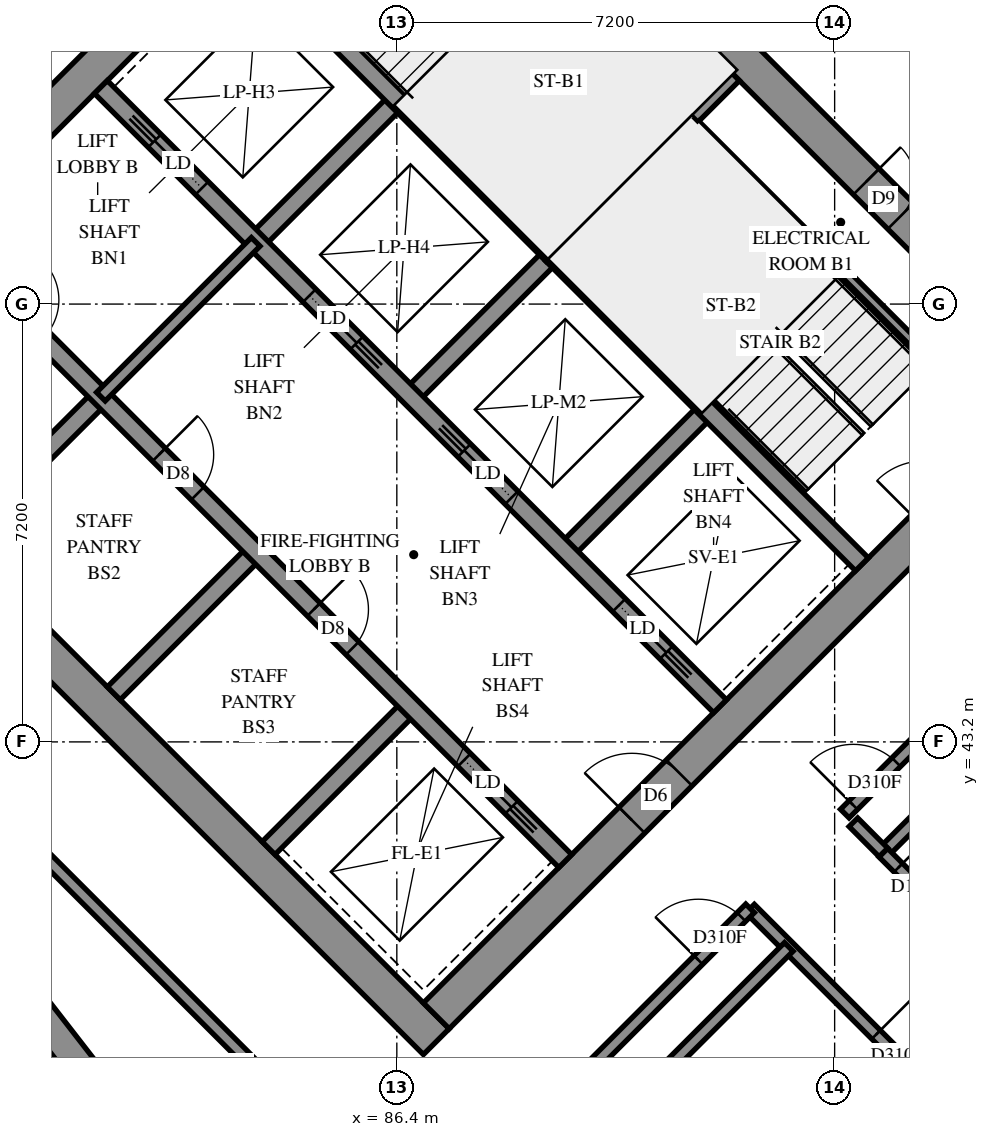
"""IFC4 building model, lengths in metres.
Left out: names, types, materials, properties, quantities, classifications, styles, units other than length and angle.
Written with IfcOpenShell. Run it as: python <this file> out.ifc"""

import sys

from ifc_helpers import new_model, si_unit, direction, frame, frame_2d, origin, place, context, subcontext, project, spatial, polyline, rectangle, outline, extrude, element, fill, save


model = new_model("IFC4")
c1 = context("Model", 3, precision=1e-05, world=origin(), true_north=direction((0.0, 1.0)))
c2 = subcontext(c1, "Body", "Model", "MODEL_VIEW")
j1 = project(units=[si_unit("LENGTHUNIT", "METRE"), si_unit("PLANEANGLEUNIT", "RADIAN")], contexts=[c1])
p1 = place(None, origin())
s1 = spatial("IfcSite", under=j1, at=p1, CompositionType="ELEMENT")
p2 = place(p1, origin())
s2 = spatial("IfcBuilding", under=s1, at=p2, CompositionType="ELEMENT")
p3 = place(p2, frame((0.0, 0.0, 159.2)))
s3 = spatial("IfcBuildingStorey", under=s2, at=p3, CompositionType="ELEMENT", Elevation=159.2)
p4 = place(p3, frame((76.018, 49.302, -0.3), z_axis=(0.0, 0.0, 1.0), x_axis=(0.7071067812, -0.7071067812, 0.0)))
e1 = element("IfcWall", 1, at=p4, inside=s3, PredefinedType="SHEAR", context=c2, shape_type="SweptSolid", body=[
    extrude(rectangle(XDim=15.6, YDim=0.6, at=frame_2d((7.8, 0.0))), origin(), (0.0, 0.0, 1.0), 2.7),
])
p5 = place(p3, frame((86.625, 59.908, -0.3), z_axis=(0.0, 0.0, 1.0), x_axis=(0.7071067812, -0.7071067812, 0.0)))
e2 = element("IfcWall", 2, at=p5, inside=s3, PredefinedType="SHEAR", context=c2, shape_type="SweptSolid", body=[
    extrude(rectangle(XDim=15.6, YDim=0.6, at=frame_2d((7.8, 0.0))), origin(), (0.0, 0.0, 1.0), 2.7),
])
p6 = place(p5, frame((10.6, 0.0, 0.3)))
e3 = element("IfcOpeningElement", 3, at=p6, cuts=e2, PredefinedType="OPENING", context=c2, shape_type="SweptSolid", body=[
    extrude(rectangle(XDim=0.8, YDim=2.1, at=frame_2d((0.4, 1.05))), frame((0.0, 0.31, 0.0), z_axis=(0.0, -1.0, 0.0), x_axis=(1.0, 0.0, 0.0)), (0.0, 0.0, 1.0), 0.62),
])
p7 = place(p3, frame((76.442, 49.302, -0.3), z_axis=(0.0, 0.0, 1.0), x_axis=(0.7071067812, 0.7071067812, 0.0)))
e4 = element("IfcWall", 4, at=p7, inside=s3, PredefinedType="SHEAR", context=c2, shape_type="SweptSolid", body=[
    extrude(rectangle(XDim=14.4, YDim=0.6, at=frame_2d((7.2, 0.0))), origin(), (0.0, 0.0, 1.0), 2.7),
])
p8 = place(p7, frame((4.55, 0.0, 0.3)))
e5 = element("IfcOpeningElement", 5, at=p8, cuts=e4, PredefinedType="OPENING", context=c2, shape_type="SweptSolid", body=[
    extrude(rectangle(XDim=1.1, YDim=2.1, at=frame_2d((0.55, 1.05))), frame((0.0, 0.31, 0.0), z_axis=(0.0, -1.0, 0.0), x_axis=(1.0, 0.0, 0.0)), (0.0, 0.0, 1.0), 0.62),
])
p9 = place(p7, frame((11.35, 0.0, 0.3)))
e6 = element("IfcOpeningElement", 6, at=p9, cuts=e4, PredefinedType="OPENING", context=c2, shape_type="SweptSolid", body=[
    extrude(rectangle(XDim=1.1, YDim=2.1, at=frame_2d((0.55, 1.05))), frame((0.0, 0.31, 0.0), z_axis=(0.0, -1.0, 0.0), x_axis=(1.0, 0.0, 0.0)), (0.0, 0.0, 1.0), 0.62),
])
p10 = place(p3, frame((87.049, 38.695, -0.3), z_axis=(0.0, 0.0, 1.0), x_axis=(0.7071067812, 0.7071067812, 0.0)))
e7 = element("IfcWall", 7, at=p10, inside=s3, PredefinedType="SHEAR", context=c2, shape_type="SweptSolid", body=[
    extrude(rectangle(XDim=14.4, YDim=0.6, at=frame_2d((7.2, 0.0))), origin(), (0.0, 0.0, 1.0), 2.7),
])
p11 = place(p10, frame((4.55, 0.0, 0.3)))
e8 = element("IfcOpeningElement", 8, at=p11, cuts=e7, PredefinedType="OPENING", context=c2, shape_type="SweptSolid", body=[
    extrude(rectangle(XDim=1.1, YDim=2.1, at=frame_2d((0.55, 1.05))), frame((0.0, 0.31, 0.0), z_axis=(0.0, -1.0, 0.0), x_axis=(1.0, 0.0, 0.0)), (0.0, 0.0, 1.0), 0.62),
])
p12 = place(p10, frame((11.35, 0.0, 0.3)))
e9 = element("IfcOpeningElement", 9, at=p12, cuts=e7, PredefinedType="OPENING", context=c2, shape_type="SweptSolid", body=[
    extrude(rectangle(XDim=1.1, YDim=2.1, at=frame_2d((0.55, 1.05))), frame((0.0, 0.31, 0.0), z_axis=(0.0, -1.0, 0.0), x_axis=(1.0, 0.0, 0.0)), (0.0, 0.0, 1.0), 0.62),
])
for number, where, z_axis, x_axis in (
    (10, (79.2, 46.544, 0.0), (0.0, 0.0, 1.0), (0.707, 0.707, 0.0)),
    (11, (84.079, 51.423, 0.0), (0.0, 0.0, 1.0), (0.707, 0.707, 0.0)),
):
    element("IfcWall", number, at=place(p3, frame(where, z_axis=z_axis, x_axis=x_axis)), inside=s3, PredefinedType="SOLIDWALL", context=c2, shape_type="SweptSolid", body=[
        extrude(rectangle(XDim=3.3, YDim=0.3, at=frame_2d((1.65, 0.0))), origin(), (0.0, 0.0, 1.0), 3.1),
    ])
p13 = place(p3, frame((81.746, 43.999, 0.0), z_axis=(0.0, 0.0, 1.0), x_axis=(0.7071067812, 0.7071067812, 0.0)))
e12 = element("IfcWall", 12, at=p13, inside=s3, PredefinedType="SOLIDWALL", context=c2, shape_type="SweptSolid", body=[
    extrude(rectangle(XDim=3.3, YDim=0.3, at=frame_2d((1.65, 0.0))), origin(), (0.0, 0.0, 1.0), 3.1),
])
p14 = place(p3, frame((86.625, 48.878, 0.0), z_axis=(0.0, 0.0, 1.0), x_axis=(0.7071067812, 0.7071067812, 0.0)))
e13 = element("IfcWall", 13, at=p14, inside=s3, PredefinedType="SOLIDWALL", context=c2, shape_type="SweptSolid", body=[
    extrude(rectangle(XDim=3.3, YDim=0.3, at=frame_2d((1.65, 0.0))), origin(), (0.0, 0.0, 1.0), 3.1),
])
p15 = place(p3, frame((84.291, 41.453, 0.0), z_axis=(0.0, 0.0, 1.0), x_axis=(0.7071067812, 0.7071067812, 0.0)))
e14 = element("IfcWall", 14, at=p15, inside=s3, PredefinedType="SOLIDWALL", context=c2, shape_type="SweptSolid", body=[
    extrude(rectangle(XDim=3.3, YDim=0.3, at=frame_2d((1.65, 0.0))), origin(), (0.0, 0.0, 1.0), 3.1),
])
p16 = place(p3, frame((89.17, 46.332, 0.0), z_axis=(0.0, 0.0, 1.0), x_axis=(0.7071067812, 0.7071067812, 0.0)))
e15 = element("IfcWall", 15, at=p16, inside=s3, PredefinedType="SOLIDWALL", context=c2, shape_type="SweptSolid", body=[
    extrude(rectangle(XDim=3.3, YDim=0.3, at=frame_2d((1.65, 0.0))), origin(), (0.0, 0.0, 1.0), 3.1),
])
p17 = place(p3, frame((78.988, 51.423, 0.0), z_axis=(0.0, 0.0, 1.0), x_axis=(0.7071067812, -0.7071067812, 0.0)))
e16 = element("IfcWall", 16, at=p17, inside=s3, PredefinedType="SOLIDWALL", context=c2, shape_type="SweptSolid", body=[
    extrude(rectangle(XDim=14.4, YDim=0.3, at=frame_2d((7.2, 0.0))), origin(), (0.0, 0.0, 1.0), 3.1),
])
p18 = place(p17, frame((1.35, 0.0, 0.0)))
e17 = element("IfcOpeningElement", 17, at=p18, cuts=e16, PredefinedType="OPENING", context=c2, shape_type="SweptSolid", body=[
    extrude(rectangle(XDim=0.9, YDim=2.1, at=frame_2d((0.45, 1.05))), frame((0.0, 0.16, 0.0), z_axis=(0.0, -1.0, 0.0), x_axis=(1.0, 0.0, 0.0)), (0.0, 0.0, 1.0), 0.32),
])
p19 = place(p17, frame((4.95, 0.0, 0.0)))
e18 = element("IfcOpeningElement", 18, at=p19, cuts=e16, PredefinedType="OPENING", context=c2, shape_type="SweptSolid", body=[
    extrude(rectangle(XDim=0.9, YDim=2.1, at=frame_2d((0.45, 1.05))), frame((0.0, 0.16, 0.0), z_axis=(0.0, -1.0, 0.0), x_axis=(1.0, 0.0, 0.0)), (0.0, 0.0, 1.0), 0.32),
])
p20 = place(p17, frame((8.55, 0.0, 0.0)))
e19 = element("IfcOpeningElement", 19, at=p20, cuts=e16, PredefinedType="OPENING", context=c2, shape_type="SweptSolid", body=[
    extrude(rectangle(XDim=0.9, YDim=2.1, at=frame_2d((0.45, 1.05))), frame((0.0, 0.16, 0.0), z_axis=(0.0, -1.0, 0.0), x_axis=(1.0, 0.0, 0.0)), (0.0, 0.0, 1.0), 0.32),
])
p21 = place(p17, frame((12.05, 0.0, 0.0)))
e20 = element("IfcOpeningElement", 20, at=p21, cuts=e16, PredefinedType="OPENING", context=c2, shape_type="SweptSolid", body=[
    extrude(rectangle(XDim=1.1, YDim=2.1, at=frame_2d((0.55, 1.05))), frame((0.0, 0.16, 0.0), z_axis=(0.0, -1.0, 0.0), x_axis=(1.0, 0.0, 0.0)), (0.0, 0.0, 1.0), 0.32),
])
p22 = place(p3, frame((81.534, 53.969, 0.0), z_axis=(0.0, 0.0, 1.0), x_axis=(0.707103309, -0.7071102534, 0.0)))
e21 = element("IfcWall", 21, at=p22, inside=s3, PredefinedType="SOLIDWALL", context=c2, shape_type="SweptSolid", body=[
    extrude(rectangle(XDim=14.4, YDim=0.3, at=frame_2d((7.2, 0.0))), origin(), (0.0, 0.0, 1.0), 3.1),
])
p23 = place(p22, frame((1.25, 0.0, 0.0)))
e22 = element("IfcOpeningElement", 22, at=p23, cuts=e21, PredefinedType="OPENING", context=c2, shape_type="SweptSolid", body=[
    extrude(rectangle(XDim=1.1, YDim=2.1, at=frame_2d((0.55, 1.05))), frame((0.0, 0.16, 0.0), z_axis=(0.0, -1.0, 0.0), x_axis=(1.0, 0.0, 0.0)), (0.0, 0.0, 1.0), 0.32),
])
p24 = place(p22, frame((4.85, 0.0, 0.0)))
e23 = element("IfcOpeningElement", 23, at=p24, cuts=e21, PredefinedType="OPENING", context=c2, shape_type="SweptSolid", body=[
    extrude(rectangle(XDim=1.1, YDim=2.1, at=frame_2d((0.55, 1.05))), frame((0.0, 0.16, 0.0), z_axis=(0.0, -1.0, 0.0), x_axis=(1.0, 0.0, 0.0)), (0.0, 0.0, 1.0), 0.32),
])
p25 = place(p22, frame((8.45, 0.0, 0.0)))
e24 = element("IfcOpeningElement", 24, at=p25, cuts=e21, PredefinedType="OPENING", context=c2, shape_type="SweptSolid", body=[
    extrude(rectangle(XDim=1.1, YDim=2.1, at=frame_2d((0.55, 1.05))), frame((0.0, 0.16, 0.0), z_axis=(0.0, -1.0, 0.0), x_axis=(1.0, 0.0, 0.0)), (0.0, 0.0, 1.0), 0.32),
])
p26 = place(p22, frame((12.05, 0.0, 0.0)))
e25 = element("IfcOpeningElement", 25, at=p26, cuts=e21, PredefinedType="OPENING", context=c2, shape_type="SweptSolid", body=[
    extrude(rectangle(XDim=1.1, YDim=2.1, at=frame_2d((0.55, 1.05))), frame((0.0, 0.16, 0.0), z_axis=(0.0, -1.0, 0.0), x_axis=(1.0, 0.0, 0.0)), (0.0, 0.0, 1.0), 0.32),
])
for number, where, z_axis, x_axis in (
    (26, (83.867, 56.302, 0.0), (0.0, 0.0, 1.0), (0.707, -0.707, 0.0)),
    (27, (88.958, 51.211, 0.0), (0.0, 0.0, 1.0), (0.707, -0.707, 0.0)),
):
    element("IfcWall", number, at=place(p3, frame(where, z_axis=z_axis, x_axis=x_axis)), inside=s3, PredefinedType="SOLIDWALL", context=c2, shape_type="SweptSolid", body=[
        extrude(rectangle(XDim=7.2, YDim=0.3, at=frame_2d((3.6, 0.0))), origin(), (0.0, 0.0, 1.0), 3.1),
    ])
p27 = place(p3, frame((88.958, 51.211, 0.0), z_axis=(0.0, 0.0, 1.0), x_axis=(0.7071067812, 0.7071067812, 0.0)))
e28 = element("IfcWall", 28, at=p27, inside=s3, PredefinedType="SOLIDWALL", context=c2, shape_type="SweptSolid", body=[
    extrude(rectangle(XDim=4.2, YDim=0.3, at=frame_2d((2.1, 0.0))), origin(), (0.0, 0.0, 1.0), 3.1),
])
p28 = place(p3, frame((80.314, 39.002, 0.0), z_axis=(0.0, 0.0, 1.0), x_axis=(0.6128921644, -0.7901665614, 0.0)))
e29 = element("IfcWall", 29, at=p28, inside=s3, PredefinedType="SOLIDWALL", context=c2, shape_type="SweptSolid", body=[
    extrude(outline(polyline([(0.05, -0.25), (4.134, -0.25), (4.071, 0.25), (-0.05, 0.25), (0.05, -0.25)])), origin(), (0.0, 0.0, 1.0), 3.1),
])
p29 = place(p28, frame((1.879, 0.0, 0.45)))
e30 = element("IfcOpeningElement", 30, at=p29, cuts=e29, PredefinedType="OPENING", context=c2, shape_type="SweptSolid", body=[
    extrude(rectangle(XDim=1.2, YDim=2.5, at=frame_2d((0.6, 1.25))), frame((0.0, 0.26, 0.0), z_axis=(0.0, -1.0, 0.0), x_axis=(1.0, 0.0, 0.0)), (0.0, 0.0, 1.0), 0.52),
])
p30 = place(p3, frame((91.313, 53.354, 0.0), z_axis=(0.0, 0.0, 1.0), x_axis=(0.7071067812, -0.7071067812, 0.0)))
e31 = element("IfcWall", 31, at=p30, inside=s3, PredefinedType="PARTITIONING", context=c2, shape_type="SweptSolid", body=[
    extrude(rectangle(XDim=5.65, YDim=0.15, at=frame_2d((2.825, 0.0))), origin(), (0.0, 0.0, 1.0), 3.1),
])
p31 = place(p3, frame((81.534, 48.878, 0.0), z_axis=(0.0, 0.0, 1.0), x_axis=(0.707092892, 0.7071206701, 0.0)))
e32 = element("IfcWall", 32, at=p31, inside=s3, PredefinedType="PARTITIONING", context=c2, shape_type="SweptSolid", body=[
    extrude(rectangle(XDim=3.6, YDim=0.2, at=frame_2d((1.8, 0.0))), origin(), (0.0, 0.0, 1.0), 3.1),
])
p32 = place(p3, frame((86.841, 63.093, 0.0), z_axis=(0.0, 0.0, 1.0), x_axis=(0.7071067812, -0.7071067812, 0.0)))
e33 = element("IfcWall", 33, at=p32, inside=s3, PredefinedType="PARTITIONING", context=c2, shape_type="SweptSolid", body=[
    extrude(rectangle(XDim=12.239, YDim=0.2, at=frame_2d((6.119, 0.0))), origin(), (0.0, 0.0, 1.0), 3.1),
])
p33 = place(p32, frame((10.634, 0.0, 0.0)))
e34 = element("IfcOpeningElement", 34, at=p33, cuts=e33, PredefinedType="OPENING", context=c2, shape_type="SweptSolid", body=[
    extrude(rectangle(XDim=0.9, YDim=2.1, at=frame_2d((0.45, 1.05))), frame((0.0, 0.11, 0.0), z_axis=(0.0, -1.0, 0.0), x_axis=(1.0, 0.0, 0.0)), (0.0, 0.0, 1.0), 0.22),
])
p34 = place(p3, frame((94.401, 41.383, 0.0), z_axis=(0.0, 0.0, 1.0), x_axis=(0.7071067812, 0.7071067812, 0.0)))
e35 = element("IfcWall", 35, at=p34, inside=s3, PredefinedType="PARTITIONING", context=c2, shape_type="SweptSolid", body=[
    extrude(rectangle(XDim=12.04, YDim=0.2, at=frame_2d((6.02, 0.0))), origin(), (0.0, 0.0, 1.0), 3.1),
])
p35 = place(p3, frame((92.209, 40.459, 0.0), z_axis=(0.0, 0.0, 1.0), x_axis=(0.7071067812, -0.7071067812, 0.0)))
e36 = element("IfcWall", 36, at=p35, inside=s3, PredefinedType="PARTITIONING", context=c2, shape_type="SweptSolid", body=[
    extrude(rectangle(XDim=11.698, YDim=0.2, at=frame_2d((5.849, 0.0))), origin(), (0.0, 0.0, 1.0), 3.1),
])
p36 = place(p35, frame((2.931, 0.0, 0.0)))
e37 = element("IfcOpeningElement", 37, at=p36, cuts=e36, PredefinedType="OPENING", context=c2, shape_type="SweptSolid", body=[
    extrude(rectangle(XDim=1.0, YDim=2.1, at=frame_2d((0.5, 1.05))), frame((0.0, 0.11, 0.0), z_axis=(0.0, -1.0, 0.0), x_axis=(1.0, 0.0, 0.0)), (0.0, 0.0, 1.0), 0.22),
])
p37 = place(p35, frame((10.223, 0.0, 0.0)))
e38 = element("IfcOpeningElement", 38, at=p37, cuts=e36, PredefinedType="OPENING", context=c2, shape_type="SweptSolid", body=[
    extrude(rectangle(XDim=0.9, YDim=2.1, at=frame_2d((0.45, 1.05))), frame((0.0, 0.11, 0.0), z_axis=(0.0, -1.0, 0.0), x_axis=(1.0, 0.0, 0.0)), (0.0, 0.0, 1.0), 0.22),
])
p38 = place(p3, frame((93.767, 42.021, 0.0), z_axis=(0.0, 0.0, 1.0), x_axis=(0.7071067812, 0.7071067812, 0.0)))
e39 = element("IfcWall", 39, at=p38, inside=s3, PredefinedType="PARTITIONING", context=c2, shape_type="SweptSolid", body=[
    extrude(rectangle(XDim=9.998, YDim=0.2, at=frame_2d((4.999, 0.0))), origin(), (0.0, 0.0, 1.0), 3.1),
])
p39 = place(p38, frame((0.196, 0.0, 0.0)))
e40 = element("IfcOpeningElement", 40, at=p39, cuts=e39, PredefinedType="OPENING", context=c2, shape_type="SweptSolid", body=[
    extrude(rectangle(XDim=1.0, YDim=2.1, at=frame_2d((0.5, 1.05))), frame((0.0, 0.11, 0.0), z_axis=(0.0, -1.0, 0.0), x_axis=(1.0, 0.0, 0.0)), (0.0, 0.0, 1.0), 0.22),
])
p40 = place(p3, frame((80.423, 41.497, 0.0), z_axis=(0.0, 0.0, 1.0), x_axis=(0.7071067812, -0.7071067812, 0.0)))
e41 = element("IfcWall", 41, at=p40, inside=s3, PredefinedType="PARTITIONING", context=c2, shape_type="SweptSolid", body=[
    extrude(rectangle(XDim=9.065, YDim=0.2, at=frame_2d((4.532, 0.0))), origin(), (0.0, 0.0, 1.0), 3.1),
])
p41 = place(p3, frame((86.837, 35.091, 0.0), z_axis=(0.0, 0.0, 1.0), x_axis=(0.7071067812, 0.7071067812, 0.0)))
e42 = element("IfcWall", 42, at=p41, inside=s3, PredefinedType="PARTITIONING", context=c2, shape_type="SweptSolid", body=[
    extrude(rectangle(XDim=7.597, YDim=0.2, at=frame_2d((3.799, 0.0))), origin(), (0.0, 0.0, 1.0), 3.1),
])
p42 = place(p41, frame((6.395, 0.0, 0.0)))
e43 = element("IfcOpeningElement", 43, at=p42, cuts=e42, PredefinedType="OPENING", context=c2, shape_type="SweptSolid", body=[
    extrude(rectangle(XDim=1.0, YDim=2.1, at=frame_2d((0.5, 1.05))), frame((0.0, 0.11, 0.0), z_axis=(0.0, -1.0, 0.0), x_axis=(1.0, 0.0, 0.0)), (0.0, 0.0, 1.0), 0.22),
])
p43 = place(p3, frame((89.586, 36.57, 0.0), z_axis=(0.0, 0.0, 1.0), x_axis=(0.7073237184, 0.7068897774, 0.0)))
e44 = element("IfcWall", 44, at=p43, inside=s3, PredefinedType="PARTITIONING", context=c2, shape_type="SweptSolid", body=[
    extrude(rectangle(XDim=4.609, YDim=0.2, at=frame_2d((2.304, 0.0))), origin(), (0.0, 0.0, 1.0), 3.1),
])
p44 = place(p3, frame((94.399, 41.379, 0.0), z_axis=(0.0, 0.0, 1.0), x_axis=(0.7071067812, -0.7071067812, 0.0)))
e45 = element("IfcWall", 45, at=p44, inside=s3, PredefinedType="PARTITIONING", context=c2, shape_type="SweptSolid", body=[
    extrude(rectangle(XDim=3.601, YDim=0.2, at=frame_2d((1.8, 0.0))), origin(), (0.0, 0.0, 1.0), 3.1),
])
p45 = place(p44, frame((0.35, 0.0, 0.0)))
e46 = element("IfcOpeningElement", 46, at=p45, cuts=e45, PredefinedType="OPENING", context=c2, shape_type="SweptSolid", body=[
    extrude(rectangle(XDim=0.9, YDim=2.1, at=frame_2d((0.45, 1.05))), frame((0.0, 0.11, 0.0), z_axis=(0.0, -1.0, 0.0), x_axis=(1.0, 0.0, 0.0)), (0.0, 0.0, 1.0), 0.22),
])
p46 = place(p3, frame((93.909, 41.879, 0.0), z_axis=(0.0, 0.0, 1.0), x_axis=(0.7056768426, -0.7085338339, 0.0)))
e47 = element("IfcWall", 47, at=p46, inside=s3, PredefinedType="PARTITIONING", context=c2, shape_type="SweptSolid", body=[
    extrude(rectangle(XDim=0.7, YDim=0.2, at=frame_2d((0.35, 0.0))), origin(), (0.0, 0.0, 1.0), 3.1),
])
p47 = place(p6, origin())
e48 = element("IfcDoor", 48, at=p47, inside=s3, OperationType="SINGLE_SWING_RIGHT", PredefinedType="DOOR", context=c2, shape_type="SweptSolid", body=[
    extrude(rectangle(XDim=0.8, YDim=2.1, at=frame_2d((0.4, 1.05))), frame((0.0, 0.025, 0.0), z_axis=(0.0, -1.0, 0.0), x_axis=(1.0, 0.0, 0.0)), (0.0, 0.0, 1.0), 0.05),
])
fill(e3, e48)
p48 = place(p11, origin())
e49 = element("IfcDoor", 49, at=p48, inside=s3, OperationType="DOUBLE_DOOR_SINGLE_SWING", PredefinedType="DOOR", context=c2, shape_type="SweptSolid", body=[
    extrude(rectangle(XDim=1.1, YDim=2.1, at=frame_2d((0.55, 1.05))), frame((0.0, 0.025, 0.0), z_axis=(0.0, -1.0, 0.0), x_axis=(1.0, 0.0, 0.0)), (0.0, 0.0, 1.0), 0.05),
])
fill(e8, e49)
p49 = place(p19, origin())
e50 = element("IfcDoor", 50, at=p49, inside=s3, OperationType="SINGLE_SWING_LEFT", PredefinedType="DOOR", context=c2, shape_type="SweptSolid", body=[
    extrude(rectangle(XDim=0.9, YDim=2.1, at=frame_2d((0.45, 1.05))), frame((0.0, 0.025, 0.0), z_axis=(0.0, -1.0, 0.0), x_axis=(1.0, 0.0, 0.0)), (0.0, 0.0, 1.0), 0.05),
])
fill(e18, e50)
p50 = place(p20, origin())
e51 = element("IfcDoor", 51, at=p50, inside=s3, OperationType="SINGLE_SWING_LEFT", PredefinedType="DOOR", context=c2, shape_type="SweptSolid", body=[
    extrude(rectangle(XDim=0.9, YDim=2.1, at=frame_2d((0.45, 1.05))), frame((0.0, 0.025, 0.0), z_axis=(0.0, -1.0, 0.0), x_axis=(1.0, 0.0, 0.0)), (0.0, 0.0, 1.0), 0.05),
])
fill(e19, e51)
p51 = place(p21, origin())
e52 = element("IfcDoor", 52, at=p51, inside=s3, OperationType="SLIDING_TO_RIGHT", PredefinedType="DOOR", context=c2, shape_type="SweptSolid", body=[
    extrude(rectangle(XDim=1.1, YDim=2.1, at=frame_2d((0.55, 1.05))), frame((0.0, 0.025, 0.0), z_axis=(0.0, -1.0, 0.0), x_axis=(1.0, 0.0, 0.0)), (0.0, 0.0, 1.0), 0.05),
])
fill(e20, e52)
p52 = place(p23, origin())
e53 = element("IfcDoor", 53, at=p52, inside=s3, OperationType="SLIDING_TO_LEFT", PredefinedType="DOOR", context=c2, shape_type="SweptSolid", body=[
    extrude(rectangle(XDim=1.1, YDim=2.1, at=frame_2d((0.55, 1.05))), frame((0.0, 0.025, 0.0), z_axis=(0.0, -1.0, 0.0), x_axis=(1.0, 0.0, 0.0)), (0.0, 0.0, 1.0), 0.05),
])
fill(e22, e53)
p53 = place(p24, origin())
e54 = element("IfcDoor", 54, at=p53, inside=s3, OperationType="SLIDING_TO_RIGHT", PredefinedType="DOOR", context=c2, shape_type="SweptSolid", body=[
    extrude(rectangle(XDim=1.1, YDim=2.1, at=frame_2d((0.55, 1.05))), frame((0.0, 0.025, 0.0), z_axis=(0.0, -1.0, 0.0), x_axis=(1.0, 0.0, 0.0)), (0.0, 0.0, 1.0), 0.05),
])
fill(e23, e54)
p54 = place(p25, origin())
e55 = element("IfcDoor", 55, at=p54, inside=s3, OperationType="SLIDING_TO_LEFT", PredefinedType="DOOR", context=c2, shape_type="SweptSolid", body=[
    extrude(rectangle(XDim=1.1, YDim=2.1, at=frame_2d((0.55, 1.05))), frame((0.0, 0.025, 0.0), z_axis=(0.0, -1.0, 0.0), x_axis=(1.0, 0.0, 0.0)), (0.0, 0.0, 1.0), 0.05),
])
fill(e24, e55)
p55 = place(p26, origin())
e56 = element("IfcDoor", 56, at=p55, inside=s3, OperationType="SLIDING_TO_RIGHT", PredefinedType="DOOR", context=c2, shape_type="SweptSolid", body=[
    extrude(rectangle(XDim=1.1, YDim=2.1, at=frame_2d((0.55, 1.05))), frame((0.0, 0.025, 0.0), z_axis=(0.0, -1.0, 0.0), x_axis=(1.0, 0.0, 0.0)), (0.0, 0.0, 1.0), 0.05),
])
fill(e25, e56)
p56 = place(p39, origin())
e57 = element("IfcDoor", 57, at=p56, inside=s3, OperationType="SINGLE_SWING_LEFT", PredefinedType="DOOR", context=c2, shape_type="SweptSolid", body=[
    extrude(rectangle(XDim=1.0, YDim=2.1, at=frame_2d((0.5, 1.05))), frame((0.0, 0.025, 0.0), z_axis=(0.0, -1.0, 0.0), x_axis=(1.0, 0.0, 0.0)), (0.0, 0.0, 1.0), 0.05),
])
fill(e40, e57)
p57 = place(p45, origin())
e58 = element("IfcDoor", 58, at=p57, inside=s3, OperationType="SINGLE_SWING_RIGHT", PredefinedType="DOOR", context=c2, shape_type="SweptSolid", body=[
    extrude(rectangle(XDim=0.9, YDim=2.1, at=frame_2d((0.45, 1.05))), frame((0.0, 0.025, 0.0), z_axis=(0.0, -1.0, 0.0), x_axis=(1.0, 0.0, 0.0)), (0.0, 0.0, 1.0), 0.05),
])
fill(e46, e58)
p58 = place(p42, origin())
e59 = element("IfcDoor", 59, at=p58, inside=s3, OperationType="SINGLE_SWING_LEFT", PredefinedType="DOOR", context=c2, shape_type="SweptSolid", body=[
    extrude(rectangle(XDim=1.0, YDim=2.1, at=frame_2d((0.5, 1.05))), frame((0.0, 0.025, 0.0), z_axis=(0.0, -1.0, 0.0), x_axis=(1.0, 0.0, 0.0)), (0.0, 0.0, 1.0), 0.05),
])
fill(e43, e59)
p59 = place(p36, origin())
e60 = element("IfcDoor", 60, at=p59, inside=s3, OperationType="SINGLE_SWING_LEFT", PredefinedType="DOOR", context=c2, shape_type="SweptSolid", body=[
    extrude(rectangle(XDim=1.0, YDim=2.1, at=frame_2d((0.5, 1.05))), frame((0.0, 0.025, 0.0), z_axis=(0.0, -1.0, 0.0), x_axis=(1.0, 0.0, 0.0)), (0.0, 0.0, 1.0), 0.05),
])
fill(e37, e60)
save(model, sys.argv[1])
